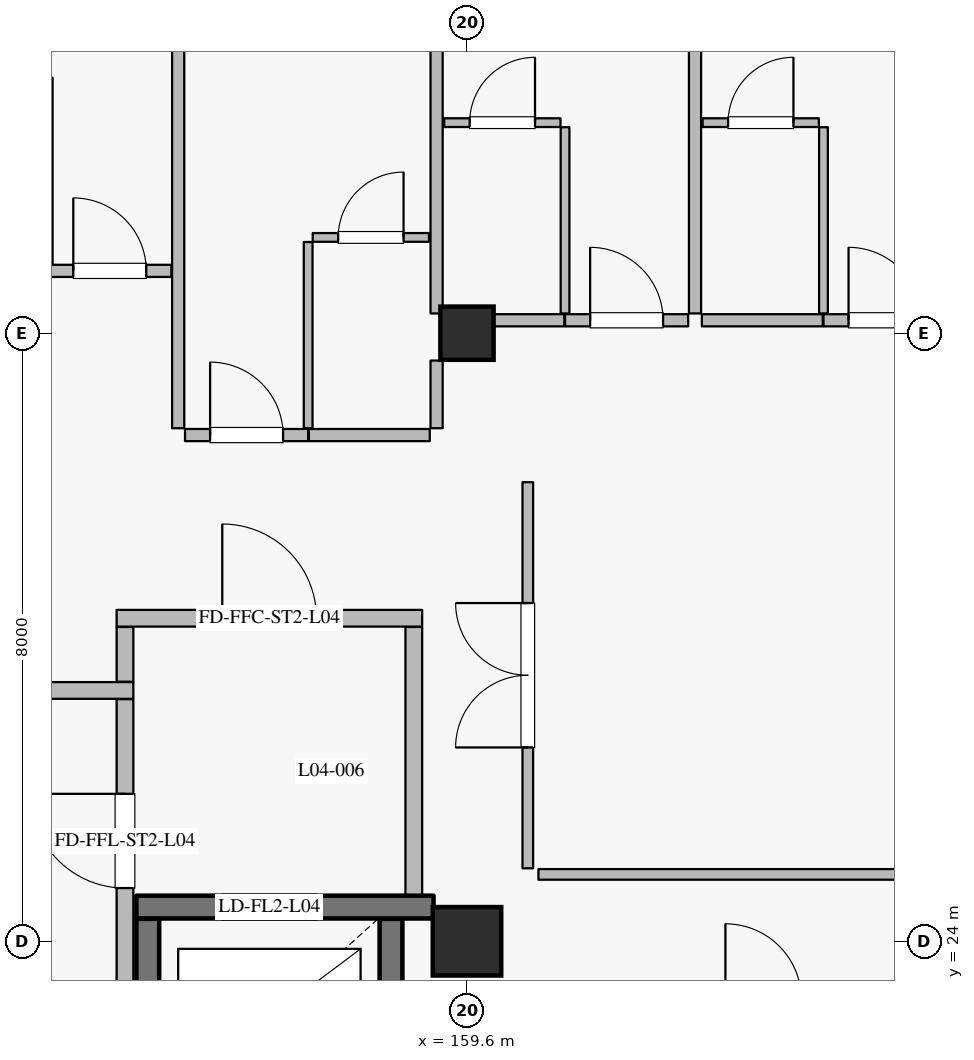
"""IFC4 building model, lengths in metres.
Left out: names, types, materials, properties, quantities, classifications, styles, units other than length and angle.
Written with IfcOpenShell. Run it as: python <this file> out.ifc"""

import sys

from ifc_helpers import new_model, si_unit, direction, frame, frame_2d, origin, origin_2d, place, context, subcontext, project, spatial, rectangle, extrude, element, fill, save


model = new_model("IFC4")
c1 = context("Model", 3, precision=1e-05, world=origin(), true_north=direction((0.0, 1.0)))
c2 = subcontext(c1, "Body", "Model", "MODEL_VIEW")
j1 = project(units=[si_unit("LENGTHUNIT", "METRE"), si_unit("PLANEANGLEUNIT", "RADIAN")], contexts=[c1])
p1 = place(None, origin())
s1 = spatial("IfcSite", under=j1, at=p1, CompositionType="ELEMENT")
p2 = place(p1, origin())
s2 = spatial("IfcBuilding", under=s1, at=p2, CompositionType="ELEMENT")
p3 = place(p2, frame((0.0, 0.0, 21.0)))
s3 = spatial("IfcBuildingStorey", under=s2, at=p3, CompositionType="ELEMENT", Elevation=21.0)
p4 = place(p3, frame((159.6, 24.0, 0.0), z_axis=(0.0, 0.0, 1.0), x_axis=(1.0, 0.0, 0.0)))
e1 = element("IfcColumn", 1, at=p4, inside=s3, PredefinedType="COLUMN", context=c2, shape_type="SweptSolid", body=[
    extrude(rectangle(XDim=0.9, YDim=0.9, at=origin_2d()), origin(), (0.0, 0.0, 1.0), 4.2),
])
p5 = place(p3, frame((159.6, 32.0, 0.0), z_axis=(0.0, 0.0, 1.0), x_axis=(1.0, 0.0, 0.0)))
e2 = element("IfcColumn", 2, at=p5, inside=s3, PredefinedType="COLUMN", context=c2, shape_type="SweptSolid", body=[
    extrude(rectangle(XDim=0.7, YDim=0.7, at=origin_2d()), origin(), (0.0, 0.0, 1.0), 4.2),
])
p6 = place(p3, frame((158.6, 21.705, 0.0), z_axis=(0.0, 0.0, 1.0), x_axis=(0.0, 1.0, 0.0)))
e3 = element("IfcWall", 3, at=p6, inside=s3, PredefinedType="SHEAR", context=c2, shape_type="SweptSolid", body=[
    extrude(rectangle(XDim=2.59, YDim=0.3, at=frame_2d((1.295, 0.0))), origin(), (0.0, 0.0, 1.0), 3.965),
])
p7 = place(p3, frame((159.16, 24.45, 0.0), z_axis=(0.0, 0.0, 1.0), x_axis=(-1.0, 0.0, 0.0)))
e4 = element("IfcWall", 4, at=p7, inside=s3, PredefinedType="SHEAR", context=c2, shape_type="SweptSolid", body=[
    extrude(rectangle(XDim=3.91, YDim=0.3, at=frame_2d((1.955, 0.0))), origin(), (0.0, 0.0, 1.0), 3.965),
])
p8 = place(p7, frame((1.535, 0.0, 0.0)))
e5 = element("IfcOpeningElement", 5, at=p8, cuts=e4, PredefinedType="OPENING", context=c2, shape_type="SweptSolid", body=[
    extrude(rectangle(XDim=1.25, YDim=2.25, at=frame_2d((0.625, 1.125))), frame((0.0, 0.16, 0.0), z_axis=(0.0, -1.0, 0.0), x_axis=(1.0, 0.0, 0.0)), (0.0, 0.0, 1.0), 0.32),
])
p9 = place(p3, frame((155.4, 24.295, 0.0), z_axis=(0.0, 0.0, 1.0), x_axis=(0.0, -1.0, 0.0)))
e6 = element("IfcWall", 6, at=p9, inside=s3, PredefinedType="SHEAR", context=c2, shape_type="SweptSolid", body=[
    extrude(rectangle(XDim=2.59, YDim=0.3, at=frame_2d((1.295, 0.0))), origin(), (0.0, 0.0, 1.0), 3.965),
])
p10 = place(p3, frame((151.39, 27.3, 0.0), z_axis=(0.0, 0.0, 1.0), x_axis=(1.0, 0.0, 0.0)))
e7 = element("IfcWall", 7, at=p10, inside=s3, PredefinedType="PARTITIONING", context=c2, shape_type="SweptSolid", body=[
    extrude(rectangle(XDim=3.82, YDim=0.22, at=frame_2d((1.91, 0.0))), origin(), (0.0, 0.0, 1.0), 3.965),
])
p11 = place(p10, frame((1.35, 0.0, 0.0)))
e8 = element("IfcOpeningElement", 8, at=p11, cuts=e7, PredefinedType="OPENING", context=c2, shape_type="SweptSolid", body=[
    extrude(rectangle(XDim=1.12, YDim=2.2, at=frame_2d((0.56, 1.1))), frame((0.0, 0.12, 0.0), z_axis=(0.0, -1.0, 0.0), x_axis=(1.0, 0.0, 0.0)), (0.0, 0.0, 1.0), 0.24),
])
p12 = place(p3, frame((155.1, 21.365, 0.0), z_axis=(0.0, 0.0, 1.0), x_axis=(0.0, 1.0, 0.0)))
e9 = element("IfcWall", 9, at=p12, inside=s3, PredefinedType="PARTITIONING", context=c2, shape_type="SweptSolid", body=[
    extrude(rectangle(XDim=5.82, YDim=0.22, at=frame_2d((2.91, 0.0))), origin(), (0.0, 0.0, 1.0), 3.965),
])
p13 = place(p12, frame((3.335, 0.0, 0.0)))
e10 = element("IfcOpeningElement", 10, at=p13, cuts=e9, PredefinedType="OPENING", context=c2, shape_type="SweptSolid", body=[
    extrude(rectangle(XDim=1.24, YDim=2.2, at=frame_2d((0.62, 1.1))), frame((0.0, 0.12, 0.0), z_axis=(0.0, -1.0, 0.0), x_axis=(1.0, 0.0, 0.0)), (0.0, 0.0, 1.0), 0.24),
])
p14 = place(p3, frame((155.1, 27.415, 0.0), z_axis=(0.0, 0.0, 1.0), x_axis=(0.0, 1.0, 0.0)))
e11 = element("IfcWall", 11, at=p14, inside=s3, PredefinedType="PARTITIONING", context=c2, shape_type="SweptSolid", body=[
    extrude(rectangle(XDim=0.72, YDim=0.22, at=frame_2d((0.36, 0.0))), origin(), (0.0, 0.0, 1.0), 3.965),
])
p15 = place(p3, frame((158.9, 24.605, 0.0), z_axis=(0.0, 0.0, 1.0), x_axis=(0.0, 1.0, 0.0)))
e12 = element("IfcWall", 12, at=p15, inside=s3, PredefinedType="PARTITIONING", context=c2, shape_type="SweptSolid", body=[
    extrude(rectangle(XDim=3.53, YDim=0.22, at=frame_2d((1.765, 0.0))), origin(), (0.0, 0.0, 1.0), 3.965),
])
p16 = place(p3, frame((154.99, 28.25, 0.0), z_axis=(0.0, 0.0, 1.0), x_axis=(1.0, 0.0, 0.0)))
e13 = element("IfcWall", 13, at=p16, inside=s3, PredefinedType="PARTITIONING", context=c2, shape_type="SweptSolid", body=[
    extrude(rectangle(XDim=4.02, YDim=0.22, at=frame_2d((2.01, 0.0))), origin(), (0.0, 0.0, 1.0), 3.965),
])
p17 = place(p16, frame((1.39, 0.0, 0.0)))
e14 = element("IfcOpeningElement", 14, at=p17, cuts=e13, PredefinedType="OPENING", context=c2, shape_type="SweptSolid", body=[
    extrude(rectangle(XDim=1.24, YDim=2.2, at=frame_2d((0.62, 1.1))), frame((0.0, 0.12, 0.0), z_axis=(0.0, -1.0, 0.0), x_axis=(1.0, 0.0, 0.0)), (0.0, 0.0, 1.0), 0.24),
])
p18 = place(p3, frame((154.09, 32.82, 0.0), z_axis=(0.0, 0.0, 1.0), x_axis=(1.0, 0.0, 0.0)))
e15 = element("IfcWall", 15, at=p18, inside=s3, PredefinedType="PARTITIONING", context=c2, shape_type="SweptSolid", body=[
    extrude(rectangle(XDim=1.62, YDim=0.16, at=frame_2d((0.81, 0.0))), origin(), (0.0, 0.0, 1.0), 3.965),
])
p19 = place(p18, frame((0.33, 0.0, 0.0)))
e16 = element("IfcOpeningElement", 16, at=p19, cuts=e15, PredefinedType="OPENING", context=c2, shape_type="SweptSolid", body=[
    extrude(rectangle(XDim=0.96, YDim=2.2, at=frame_2d((0.48, 1.1))), frame((0.0, 0.09, 0.0), z_axis=(0.0, -1.0, 0.0), x_axis=(1.0, 0.0, 0.0)), (0.0, 0.0, 1.0), 0.18),
])
p20 = place(p3, frame((154.09, 32.91, 0.0), z_axis=(0.0, 0.0, 1.0), x_axis=(0.0, 1.0, 0.0)))
e17 = element("IfcWall", 17, at=p20, inside=s3, PredefinedType="PARTITIONING", context=c2, shape_type="SweptSolid", body=[
    extrude(rectangle(XDim=2.45, YDim=0.115, at=frame_2d((1.225, 0.0))), origin(), (0.0, 0.0, 1.0), 3.965),
])
p21 = place(p3, frame((155.89, 30.66, 0.0), z_axis=(0.0, 0.0, 1.0), x_axis=(1.0, 0.0, 0.0)))
e18 = element("IfcWall", 18, at=p21, inside=s3, PredefinedType="PARTITIONING", context=c2, shape_type="SweptSolid", body=[
    extrude(rectangle(XDim=1.62, YDim=0.16, at=frame_2d((0.81, 0.0))), origin(), (0.0, 0.0, 1.0), 3.965),
])
p22 = place(p21, frame((0.33, 0.0, 0.0)))
e19 = element("IfcOpeningElement", 19, at=p22, cuts=e18, PredefinedType="OPENING", context=c2, shape_type="SweptSolid", body=[
    extrude(rectangle(XDim=0.96, YDim=2.2, at=frame_2d((0.48, 1.1))), frame((0.0, 0.09, 0.0), z_axis=(0.0, -1.0, 0.0), x_axis=(1.0, 0.0, 0.0)), (0.0, 0.0, 1.0), 0.18),
])
p23 = place(p3, frame((157.52, 30.66, 0.0), z_axis=(0.0, 0.0, 1.0), x_axis=(1.0, 0.0, 0.0)))
e20 = element("IfcWall", 20, at=p23, inside=s3, PredefinedType="PARTITIONING", context=c2, shape_type="SweptSolid", body=[
    extrude(rectangle(XDim=1.59, YDim=0.16, at=frame_2d((0.795, 0.0))), origin(), (0.0, 0.0, 1.0), 3.965),
])
p24 = place(p3, frame((157.51, 30.75, 0.0), z_axis=(0.0, 0.0, 1.0), x_axis=(0.0, 1.0, 0.0)))
e21 = element("IfcWall", 21, at=p24, inside=s3, PredefinedType="PARTITIONING", context=c2, shape_type="SweptSolid", body=[
    extrude(rectangle(XDim=2.45, YDim=0.115, at=frame_2d((1.225, 0.0))), origin(), (0.0, 0.0, 1.0), 3.965),
])
p25 = place(p3, frame((157.57, 33.26, 0.0), z_axis=(0.0, 0.0, 1.0), x_axis=(1.0, 0.0, 0.0)))
e22 = element("IfcWall", 22, at=p25, inside=s3, PredefinedType="PARTITIONING", context=c2, shape_type="SweptSolid", body=[
    extrude(rectangle(XDim=1.53, YDim=0.115, at=frame_2d((0.765, 0.0))), origin(), (0.0, 0.0, 1.0), 3.965),
])
p26 = place(p25, frame((0.335, 0.0, 0.0)))
e23 = element("IfcOpeningElement", 23, at=p26, cuts=e22, PredefinedType="OPENING", context=c2, shape_type="SweptSolid", body=[
    extrude(rectangle(XDim=0.86, YDim=2.12, at=frame_2d((0.43, 1.06))), frame((0.0, 0.067, 0.0), z_axis=(0.0, -1.0, 0.0), x_axis=(1.0, 0.0, 0.0)), (0.0, 0.0, 1.0), 0.135),
])
p27 = place(p3, frame((155.8, 30.75, 0.0), z_axis=(0.0, 0.0, 1.0), x_axis=(0.0, 1.0, 0.0)))
e24 = element("IfcWall", 24, at=p27, inside=s3, PredefinedType="PARTITIONING", context=c2, shape_type="SweptSolid", body=[
    extrude(rectangle(XDim=8.91, YDim=0.16, at=frame_2d((4.455, 0.0))), origin(), (0.0, 0.0, 1.0), 3.965),
])
p28 = place(p3, frame((159.2, 30.75, 0.0), z_axis=(0.0, 0.0, 1.0), x_axis=(0.0, 1.0, 0.0)))
e25 = element("IfcWall", 25, at=p28, inside=s3, PredefinedType="PARTITIONING", context=c2, shape_type="SweptSolid", body=[
    extrude(rectangle(XDim=0.89, YDim=0.16, at=frame_2d((0.445, 0.0))), origin(), (0.0, 0.0, 1.0), 3.965),
])
p29 = place(p3, frame((159.29, 32.17, 0.0), z_axis=(0.0, 0.0, 1.0), x_axis=(1.0, 0.0, 0.0)))
e26 = element("IfcWall", 26, at=p29, inside=s3, PredefinedType="PARTITIONING", context=c2, shape_type="SweptSolid", body=[
    extrude(rectangle(XDim=1.59, YDim=0.16, at=frame_2d((0.795, 0.0))), origin(), (0.0, 0.0, 1.0), 3.965),
])
p30 = place(p3, frame((160.89, 32.17, 0.0), z_axis=(0.0, 0.0, 1.0), x_axis=(1.0, 0.0, 0.0)))
e27 = element("IfcWall", 27, at=p30, inside=s3, PredefinedType="PARTITIONING", context=c2, shape_type="SweptSolid", body=[
    extrude(rectangle(XDim=1.62, YDim=0.16, at=frame_2d((0.81, 0.0))), origin(), (0.0, 0.0, 1.0), 3.965),
])
p31 = place(p30, frame((0.33, 0.0, 0.0)))
e28 = element("IfcOpeningElement", 28, at=p31, cuts=e27, PredefinedType="OPENING", context=c2, shape_type="SweptSolid", body=[
    extrude(rectangle(XDim=0.96, YDim=2.2, at=frame_2d((0.48, 1.1))), frame((0.0, 0.09, 0.0), z_axis=(0.0, -1.0, 0.0), x_axis=(1.0, 0.0, 0.0)), (0.0, 0.0, 1.0), 0.18),
])
p32 = place(p3, frame((160.89, 32.26, 0.0), z_axis=(0.0, 0.0, 1.0), x_axis=(0.0, 1.0, 0.0)))
e29 = element("IfcWall", 29, at=p32, inside=s3, PredefinedType="PARTITIONING", context=c2, shape_type="SweptSolid", body=[
    extrude(rectangle(XDim=2.45, YDim=0.115, at=frame_2d((1.225, 0.0))), origin(), (0.0, 0.0, 1.0), 3.965),
])
p33 = place(p3, frame((159.3, 34.77, 0.0), z_axis=(0.0, 0.0, 1.0), x_axis=(1.0, 0.0, 0.0)))
e30 = element("IfcWall", 30, at=p33, inside=s3, PredefinedType="PARTITIONING", context=c2, shape_type="SweptSolid", body=[
    extrude(rectangle(XDim=1.53, YDim=0.115, at=frame_2d((0.765, 0.0))), origin(), (0.0, 0.0, 1.0), 3.965),
])
p34 = place(p33, frame((0.335, 0.0, 0.0)))
e31 = element("IfcOpeningElement", 31, at=p34, cuts=e30, PredefinedType="OPENING", context=c2, shape_type="SweptSolid", body=[
    extrude(rectangle(XDim=0.86, YDim=2.12, at=frame_2d((0.43, 1.06))), frame((0.0, 0.067, 0.0), z_axis=(0.0, -1.0, 0.0), x_axis=(1.0, 0.0, 0.0)), (0.0, 0.0, 1.0), 0.135),
])
p35 = place(p3, frame((159.2, 32.26, 0.0), z_axis=(0.0, 0.0, 1.0), x_axis=(0.0, 1.0, 0.0)))
e32 = element("IfcWall", 32, at=p35, inside=s3, PredefinedType="PARTITIONING", context=c2, shape_type="SweptSolid", body=[
    extrude(rectangle(XDim=7.4, YDim=0.16, at=frame_2d((3.7, 0.0))), origin(), (0.0, 0.0, 1.0), 3.965),
])
p36 = place(p3, frame((162.69, 32.17, 0.0), z_axis=(0.0, 0.0, 1.0), x_axis=(1.0, 0.0, 0.0)))
e33 = element("IfcWall", 33, at=p36, inside=s3, PredefinedType="PARTITIONING", context=c2, shape_type="SweptSolid", body=[
    extrude(rectangle(XDim=1.59, YDim=0.16, at=frame_2d((0.795, 0.0))), origin(), (0.0, 0.0, 1.0), 3.965),
])
p37 = place(p3, frame((164.29, 32.17, 0.0), z_axis=(0.0, 0.0, 1.0), x_axis=(1.0, 0.0, 0.0)))
e34 = element("IfcWall", 34, at=p37, inside=s3, PredefinedType="PARTITIONING", context=c2, shape_type="SweptSolid", body=[
    extrude(rectangle(XDim=1.62, YDim=0.16, at=frame_2d((0.81, 0.0))), origin(), (0.0, 0.0, 1.0), 3.965),
])
p38 = place(p37, frame((0.33, 0.0, 0.0)))
e35 = element("IfcOpeningElement", 35, at=p38, cuts=e34, PredefinedType="OPENING", context=c2, shape_type="SweptSolid", body=[
    extrude(rectangle(XDim=0.96, YDim=2.2, at=frame_2d((0.48, 1.1))), frame((0.0, 0.09, 0.0), z_axis=(0.0, -1.0, 0.0), x_axis=(1.0, 0.0, 0.0)), (0.0, 0.0, 1.0), 0.18),
])
p39 = place(p3, frame((164.29, 32.26, 0.0), z_axis=(0.0, 0.0, 1.0), x_axis=(0.0, 1.0, 0.0)))
e36 = element("IfcWall", 36, at=p39, inside=s3, PredefinedType="PARTITIONING", context=c2, shape_type="SweptSolid", body=[
    extrude(rectangle(XDim=2.45, YDim=0.115, at=frame_2d((1.225, 0.0))), origin(), (0.0, 0.0, 1.0), 3.965),
])
p40 = place(p3, frame((162.7, 34.77, 0.0), z_axis=(0.0, 0.0, 1.0), x_axis=(1.0, 0.0, 0.0)))
e37 = element("IfcWall", 37, at=p40, inside=s3, PredefinedType="PARTITIONING", context=c2, shape_type="SweptSolid", body=[
    extrude(rectangle(XDim=1.53, YDim=0.115, at=frame_2d((0.765, 0.0))), origin(), (0.0, 0.0, 1.0), 3.965),
])
p41 = place(p40, frame((0.335, 0.0, 0.0)))
e38 = element("IfcOpeningElement", 38, at=p41, cuts=e37, PredefinedType="OPENING", context=c2, shape_type="SweptSolid", body=[
    extrude(rectangle(XDim=0.86, YDim=2.12, at=frame_2d((0.43, 1.06))), frame((0.0, 0.067, 0.0), z_axis=(0.0, -1.0, 0.0), x_axis=(1.0, 0.0, 0.0)), (0.0, 0.0, 1.0), 0.135),
])
p42 = place(p3, frame((162.6, 32.26, 0.0), z_axis=(0.0, 0.0, 1.0), x_axis=(0.0, 1.0, 0.0)))
e39 = element("IfcWall", 39, at=p42, inside=s3, PredefinedType="PARTITIONING", context=c2, shape_type="SweptSolid", body=[
    extrude(rectangle(XDim=10.26, YDim=0.16, at=frame_2d((5.13, 0.0))), origin(), (0.0, 0.0, 1.0), 3.965),
])
p43 = place(p3, frame((160.4, 24.96, 0.0), z_axis=(0.0, 0.0, 1.0), x_axis=(0.0, 1.0, 0.0)))
e40 = element("IfcWall", 40, at=p43, inside=s3, PredefinedType="PARTITIONING", context=c2, shape_type="SweptSolid", body=[
    extrude(rectangle(XDim=5.08, YDim=0.14, at=frame_2d((2.54, 0.0))), origin(), (0.0, 0.0, 1.0), 3.965),
])
p44 = place(p43, frame((1.59, 0.0, 0.0)))
e41 = element("IfcOpeningElement", 41, at=p44, cuts=e40, PredefinedType="OPENING", context=c2, shape_type="SweptSolid", body=[
    extrude(rectangle(XDim=1.9, YDim=2.4, at=frame_2d((0.95, 1.2))), frame((0.0, 0.08, 0.0), z_axis=(0.0, -1.0, 0.0), x_axis=(1.0, 0.0, 0.0)), (0.0, 0.0, 1.0), 0.16),
])
p45 = place(p3, frame((160.54, 24.88, 0.0), z_axis=(0.0, 0.0, 1.0), x_axis=(1.0, 0.0, 0.0)))
e42 = element("IfcWall", 42, at=p45, inside=s3, PredefinedType="PARTITIONING", context=c2, shape_type="SweptSolid", body=[
    extrude(rectangle(XDim=6.41, YDim=0.14, at=frame_2d((3.205, 0.0))), origin(), (0.0, 0.0, 1.0), 3.965),
])
p46 = place(p8, origin())
e43 = element("IfcDoor", 43, at=p46, inside=s3, OperationType="DOUBLE_DOOR_SLIDING", PredefinedType="DOOR", context=c2, shape_type="SweptSolid", body=[
    extrude(rectangle(XDim=1.25, YDim=2.25, at=frame_2d((0.625, 1.125))), frame((0.0, 0.025, 0.0), z_axis=(0.0, -1.0, 0.0), x_axis=(1.0, 0.0, 0.0)), (0.0, 0.0, 1.0), 0.05),
])
fill(e5, e43)
p47 = place(p13, origin())
e44 = element("IfcDoor", 44, at=p47, inside=s3, OperationType="SINGLE_SWING_RIGHT", PredefinedType="DOOR", context=c2, shape_type="SweptSolid", body=[
    extrude(rectangle(XDim=1.24, YDim=2.2, at=frame_2d((0.62, 1.1))), frame((0.0, 0.025, 0.0), z_axis=(0.0, -1.0, 0.0), x_axis=(1.0, 0.0, 0.0)), (0.0, 0.0, 1.0), 0.05),
])
fill(e10, e44)
p48 = place(p17, origin())
e45 = element("IfcDoor", 45, at=p48, inside=s3, OperationType="SINGLE_SWING_LEFT", PredefinedType="DOOR", context=c2, shape_type="SweptSolid", body=[
    extrude(rectangle(XDim=1.24, YDim=2.2, at=frame_2d((0.62, 1.1))), frame((0.0, 0.025, 0.0), z_axis=(0.0, -1.0, 0.0), x_axis=(1.0, 0.0, 0.0)), (0.0, 0.0, 1.0), 0.05),
])
fill(e14, e45)
p49 = place(p19, origin())
e46 = element("IfcDoor", 46, at=p49, inside=s3, OperationType="SINGLE_SWING_LEFT", PredefinedType="DOOR", context=c2, shape_type="SweptSolid", body=[
    extrude(rectangle(XDim=0.96, YDim=2.2, at=frame_2d((0.48, 1.1))), frame((0.0, 0.025, 0.0), z_axis=(0.0, -1.0, 0.0), x_axis=(1.0, 0.0, 0.0)), (0.0, 0.0, 1.0), 0.05),
])
fill(e16, e46)
p50 = place(p22, origin())
e47 = element("IfcDoor", 47, at=p50, inside=s3, OperationType="SINGLE_SWING_LEFT", PredefinedType="DOOR", context=c2, shape_type="SweptSolid", body=[
    extrude(rectangle(XDim=0.96, YDim=2.2, at=frame_2d((0.48, 1.1))), frame((0.0, 0.025, 0.0), z_axis=(0.0, -1.0, 0.0), x_axis=(1.0, 0.0, 0.0)), (0.0, 0.0, 1.0), 0.05),
])
fill(e19, e47)
p51 = place(p26, origin())
e48 = element("IfcDoor", 48, at=p51, inside=s3, OperationType="SINGLE_SWING_RIGHT", PredefinedType="DOOR", context=c2, shape_type="SweptSolid", body=[
    extrude(rectangle(XDim=0.86, YDim=2.12, at=frame_2d((0.43, 1.06))), frame((0.0, 0.025, 0.0), z_axis=(0.0, -1.0, 0.0), x_axis=(1.0, 0.0, 0.0)), (0.0, 0.0, 1.0), 0.05),
])
fill(e23, e48)
p52 = place(p31, origin())
e49 = element("IfcDoor", 49, at=p52, inside=s3, OperationType="SINGLE_SWING_LEFT", PredefinedType="DOOR", context=c2, shape_type="SweptSolid", body=[
    extrude(rectangle(XDim=0.96, YDim=2.2, at=frame_2d((0.48, 1.1))), frame((0.0, 0.025, 0.0), z_axis=(0.0, -1.0, 0.0), x_axis=(1.0, 0.0, 0.0)), (0.0, 0.0, 1.0), 0.05),
])
fill(e28, e49)
p53 = place(p34, origin())
e50 = element("IfcDoor", 50, at=p53, inside=s3, OperationType="SINGLE_SWING_RIGHT", PredefinedType="DOOR", context=c2, shape_type="SweptSolid", body=[
    extrude(rectangle(XDim=0.86, YDim=2.12, at=frame_2d((0.43, 1.06))), frame((0.0, 0.025, 0.0), z_axis=(0.0, -1.0, 0.0), x_axis=(1.0, 0.0, 0.0)), (0.0, 0.0, 1.0), 0.05),
])
fill(e31, e50)
p54 = place(p38, origin())
e51 = element("IfcDoor", 51, at=p54, inside=s3, OperationType="SINGLE_SWING_LEFT", PredefinedType="DOOR", context=c2, shape_type="SweptSolid", body=[
    extrude(rectangle(XDim=0.96, YDim=2.2, at=frame_2d((0.48, 1.1))), frame((0.0, 0.025, 0.0), z_axis=(0.0, -1.0, 0.0), x_axis=(1.0, 0.0, 0.0)), (0.0, 0.0, 1.0), 0.05),
])
fill(e35, e51)
p55 = place(p41, origin())
e52 = element("IfcDoor", 52, at=p55, inside=s3, OperationType="SINGLE_SWING_RIGHT", PredefinedType="DOOR", context=c2, shape_type="SweptSolid", body=[
    extrude(rectangle(XDim=0.86, YDim=2.12, at=frame_2d((0.43, 1.06))), frame((0.0, 0.025, 0.0), z_axis=(0.0, -1.0, 0.0), x_axis=(1.0, 0.0, 0.0)), (0.0, 0.0, 1.0), 0.05),
])
fill(e38, e52)
p56 = place(p44, origin())
e53 = element("IfcDoor", 53, at=p56, inside=s3, OperationType="DOUBLE_DOOR_SINGLE_SWING", PredefinedType="DOOR", context=c2, shape_type="SweptSolid", body=[
    extrude(rectangle(XDim=1.9, YDim=2.4, at=frame_2d((0.95, 1.2))), frame((0.0, 0.025, 0.0), z_axis=(0.0, -1.0, 0.0), x_axis=(1.0, 0.0, 0.0)), (0.0, 0.0, 1.0), 0.05),
])
fill(e41, e53)
save(model, sys.argv[1])
